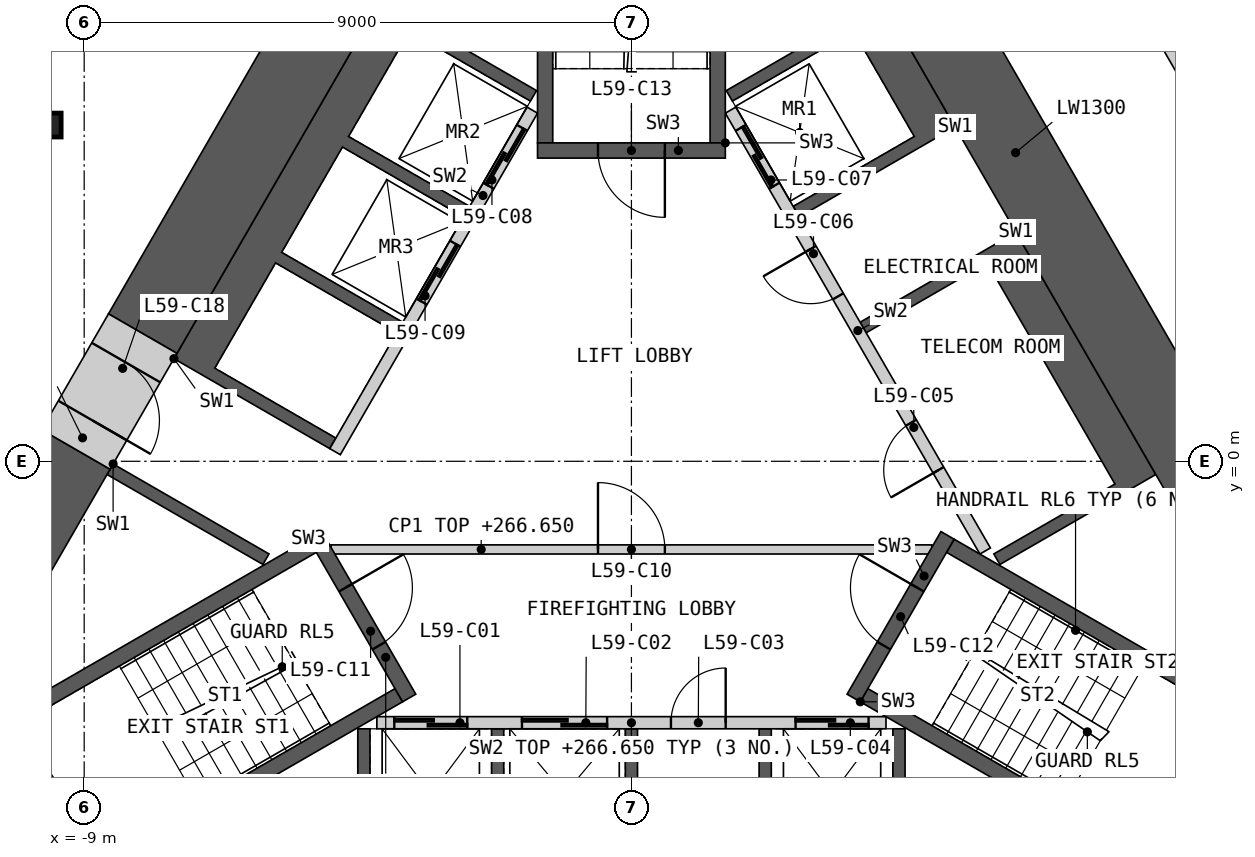
"""IFC4 building model, lengths in metres.
Left out: names, types, materials, properties, quantities, classifications, styles, units other than length and angle.
Written with IfcOpenShell. Run it as: python <this file> out.ifc"""

import sys

from ifc_helpers import new_model, si_unit, direction, frame, frame_2d, origin, origin_2d, place, context, subcontext, project, spatial, polyline, rectangle, i_section, outline, extrude, element, fill, save


model = new_model("IFC4")
c1 = context("Model", 3, precision=1e-05, world=origin(), true_north=direction((0.0, 1.0)))
c2 = subcontext(c1, "Body", "Model", "MODEL_VIEW")
j1 = project(units=[si_unit("LENGTHUNIT", "METRE"), si_unit("PLANEANGLEUNIT", "RADIAN")], contexts=[c1])
p1 = place(None, origin())
s1 = spatial("IfcSite", under=j1, at=p1, CompositionType="ELEMENT")
p2 = place(p1, origin())
s2 = spatial("IfcBuilding", under=s1, at=p2, CompositionType="ELEMENT")
p3 = place(p2, frame((0.0, 0.0, 263.4)))
s3 = spatial("IfcBuildingStorey", under=s2, at=p3, CompositionType="ELEMENT", Elevation=263.4)
p4 = place(p3, frame((-9.578, 5.53, 0.0), z_axis=(0.0, 0.0, 1.0), x_axis=(1.0, 0.0, 0.0)))
e1 = element("IfcColumn", 1, at=p4, inside=s3, PredefinedType="COLUMN", context=c2, shape_type="SweptSolid", body=[
    extrude(i_section(OverallWidth=0.399, OverallDepth=0.393, WebThickness=0.023, FlangeThickness=0.037, at=origin_2d()), origin(), (0.0, 0.0, 1.0), 3.6),
])
p5 = place(p3, origin())
e2 = element("IfcWall", 2, at=p5, inside=s3, PredefinedType="SHEAR", context=c2, shape_type="SweptSolid", body=[
    extrude(outline(polyline([(0.1, -7.36), (-4.5, -7.36), (-4.5, -4.4), (-4.3, -4.4), (-4.3, -6.7), (-2.3, -6.7), (-2.3, -4.4), (-2.1, -4.4), (-2.1, -6.7), (-0.1, -6.7), (-0.1, -4.4), (0.1, -4.4), (0.1, -7.36)])), origin(), (0.0, 0.0, 1.0), 3.25),
])
p6 = place(p3, origin())
e3 = element("IfcWall", 3, at=p6, inside=s3, PredefinedType="SHEAR", context=c2, shape_type="SweptSolid", body=[
    extrude(outline(polyline([(2.1, -7.36), (2.1, -4.4), (2.3, -4.4), (2.3, -6.7), (4.3, -6.7), (4.3, -4.4), (4.5, -4.4), (4.5, -7.36), (2.1, -7.36)])), origin(), (0.0, 0.0, 1.0), 3.25),
])
p7 = place(p3, frame((-4.187, -4.3, 0.0), z_axis=(0.0, 0.0, 1.0), x_axis=(1.0, 0.0, 0.0)))
e4 = element("IfcWall", 4, at=p7, inside=s3, PredefinedType="SOLIDWALL", context=c2, shape_type="SweptSolid", body=[
    extrude(rectangle(XDim=8.373, YDim=0.2, at=frame_2d((4.187, 0.0))), origin(), (0.0, 0.0, 1.0), 3.25),
])
p8 = place(p7, frame((0.287, 0.0, 0.0)))
e5 = element("IfcOpeningElement", 5, at=p8, cuts=e4, PredefinedType="OPENING", context=c2, shape_type="SweptSolid", body=[
    extrude(rectangle(XDim=1.2, YDim=2.1, at=frame_2d((0.6, 1.05))), frame((0.0, 0.11, 0.0), z_axis=(0.0, -1.0, 0.0), x_axis=(1.0, 0.0, 0.0)), (0.0, 0.0, 1.0), 0.22),
])
p9 = place(p7, frame((2.387, 0.0, 0.0)))
e6 = element("IfcOpeningElement", 6, at=p9, cuts=e4, PredefinedType="OPENING", context=c2, shape_type="SweptSolid", body=[
    extrude(rectangle(XDim=1.4, YDim=2.1, at=frame_2d((0.7, 1.05))), frame((0.0, 0.11, 0.0), z_axis=(0.0, -1.0, 0.0), x_axis=(1.0, 0.0, 0.0)), (0.0, 0.0, 1.0), 0.22),
])
p10 = place(p7, frame((4.837, 0.0, 0.0)))
e7 = element("IfcOpeningElement", 7, at=p10, cuts=e4, PredefinedType="OPENING", context=c2, shape_type="SweptSolid", body=[
    extrude(rectangle(XDim=0.9, YDim=2.1, at=frame_2d((0.45, 1.05))), frame((0.0, 0.11, 0.0), z_axis=(0.0, -1.0, 0.0), x_axis=(1.0, 0.0, 0.0)), (0.0, 0.0, 1.0), 0.22),
])
p11 = place(p7, frame((6.887, 0.0, 0.0)))
e8 = element("IfcOpeningElement", 8, at=p11, cuts=e4, PredefinedType="OPENING", context=c2, shape_type="SweptSolid", body=[
    extrude(rectangle(XDim=1.2, YDim=2.1, at=frame_2d((0.6, 1.05))), frame((0.0, 0.11, 0.0), z_axis=(0.0, -1.0, 0.0), x_axis=(1.0, 0.0, 0.0)), (0.0, 0.0, 1.0), 0.22),
])
p12 = place(p3, origin())
e9 = element("IfcWall", 9, at=p12, inside=s3, PredefinedType="SHEAR", context=c2, shape_type="SweptSolid", body=[
    extrude(outline(polyline([(6.324, 3.767), (8.624, -0.217), (8.231, -0.444), (6.061, -1.697), (5.96, -1.524), (7.952, -0.374), (5.852, 3.263), (3.861, 2.113), (3.76, 2.287), (5.931, 3.54), (6.324, 3.767)])), origin(), (0.0, 0.0, 1.0), 3.25),
])
p13 = place(p3, origin())
e10 = element("IfcWall", 10, at=p13, inside=s3, PredefinedType="SHEAR", context=c2, shape_type="SweptSolid", body=[
    extrude(outline(polyline([(5.324, 5.499), (4.931, 5.272), (2.76, 4.019), (2.66, 4.192), (4.652, 5.342), (3.652, 7.074), (1.66, 5.924), (1.561, 6.097), (3.731, 7.35), (4.124, 7.577), (5.324, 5.499)])), origin(), (0.0, 0.0, 1.0), 3.25),
])
p14 = place(p3, frame((5.817, -1.476, 0.0), z_axis=(0.0, 0.0, 1.0), x_axis=(-0.500002616675, 0.866023893041, 0.0)))
e11 = element("IfcWall", 11, at=p14, inside=s3, PredefinedType="SOLIDWALL", context=c2, shape_type="SweptSolid", body=[
    extrude(rectangle(XDim=8.373, YDim=0.2, at=frame_2d((4.187, 0.0))), origin(), (0.0, 0.0, 1.0), 3.25),
])
p15 = place(p14, frame((1.537, 0.0, 0.0)))
e12 = element("IfcOpeningElement", 12, at=p15, cuts=e11, PredefinedType="OPENING", context=c2, shape_type="SweptSolid", body=[
    extrude(rectangle(XDim=0.9, YDim=2.1, at=frame_2d((0.45, 1.05))), frame((0.0, 0.11, 0.0), z_axis=(0.0, -1.0, 0.0), x_axis=(1.0, 0.0, 0.0)), (0.0, 0.0, 1.0), 0.22),
])
p16 = place(p14, frame((4.837, 0.0, 0.0)))
e13 = element("IfcOpeningElement", 13, at=p16, cuts=e11, PredefinedType="OPENING", context=c2, shape_type="SweptSolid", body=[
    extrude(rectangle(XDim=0.9, YDim=2.1, at=frame_2d((0.45, 1.05))), frame((0.0, 0.11, 0.0), z_axis=(0.0, -1.0, 0.0), x_axis=(1.0, 0.0, 0.0)), (0.0, 0.0, 1.0), 0.22),
])
p17 = place(p14, frame((6.937, 0.0, 0.0)))
e14 = element("IfcOpeningElement", 14, at=p17, cuts=e11, PredefinedType="OPENING", context=c2, shape_type="SweptSolid", body=[
    extrude(rectangle(XDim=1.1, YDim=2.1, at=frame_2d((0.55, 1.05))), frame((0.0, 0.11, 0.0), z_axis=(0.0, -1.0, 0.0), x_axis=(1.0, 0.0, 0.0)), (0.0, 0.0, 1.0), 0.22),
])
p18 = place(p3, origin())
e15 = element("IfcWall", 15, at=p18, inside=s3, PredefinedType="SHEAR", context=c2, shape_type="SweptSolid", body=[
    extrude(outline(polyline([(-7.524, 1.688), (-4.124, 7.577), (-3.731, 7.35), (-1.561, 6.097), (-1.66, 5.924), (-3.652, 7.074), (-4.652, 5.342), (-2.66, 4.192), (-2.76, 4.019), (-4.752, 5.169), (-5.752, 3.437), (-3.76, 2.287), (-3.861, 2.113), (-5.852, 3.263), (-6.852, 1.531), (-4.861, 0.381), (-4.96, 0.208), (-7.131, 1.461), (-7.524, 1.688)])), origin(), (0.0, 0.0, 1.0), 3.25),
])
p19 = place(p3, origin())
e16 = element("IfcWall", 16, at=p19, inside=s3, PredefinedType="SHEAR", context=c2, shape_type="SweptSolid", body=[
    extrude(outline(polyline([(-8.524, -0.044), (-8.131, -0.271), (-5.96, -1.524), (-6.061, -1.697), (-8.231, -0.444), (-8.624, -0.217), (-8.524, -0.044)])), origin(), (0.0, 0.0, 1.0), 3.25),
])
p20 = place(p3, frame((-1.631, 5.776, 0.0), z_axis=(0.0, 0.0, 1.0), x_axis=(-0.499992876559, -0.866029516466, 0.0)))
e17 = element("IfcWall", 17, at=p20, inside=s3, PredefinedType="SOLIDWALL", context=c2, shape_type="SweptSolid", body=[
    extrude(rectangle(XDim=6.486, YDim=0.2, at=frame_2d((3.243, 0.0))), origin(), (0.0, 0.0, 1.0), 3.25),
])
p21 = place(p20, frame((0.337, 0.0, 0.0)))
e18 = element("IfcOpeningElement", 18, at=p21, cuts=e17, PredefinedType="OPENING", context=c2, shape_type="SweptSolid", body=[
    extrude(rectangle(XDim=1.1, YDim=2.1, at=frame_2d((0.55, 1.05))), frame((0.0, 0.11, 0.0), z_axis=(0.0, -1.0, 0.0), x_axis=(1.0, 0.0, 0.0)), (0.0, 0.0, 1.0), 0.22),
])
p22 = place(p20, frame((2.537, 0.0, 0.0)))
e19 = element("IfcOpeningElement", 19, at=p22, cuts=e17, PredefinedType="OPENING", context=c2, shape_type="SweptSolid", body=[
    extrude(rectangle(XDim=1.1, YDim=2.1, at=frame_2d((0.55, 1.05))), frame((0.0, 0.11, 0.0), z_axis=(0.0, -1.0, 0.0), x_axis=(1.0, 0.0, 0.0)), (0.0, 0.0, 1.0), 0.22),
])
p23 = place(p3, frame((-4.941, -1.45, 0.0), z_axis=(0.0, 0.0, 1.0), x_axis=(1.0, 0.0, 0.0)))
e20 = element("IfcWall", 20, at=p23, inside=s3, PredefinedType="PARTITIONING", context=c2, shape_type="SweptSolid", body=[
    extrude(rectangle(XDim=9.882, YDim=0.15, at=frame_2d((4.941, 0.0))), origin(), (0.0, 0.0, 1.0), 3.25),
])
p24 = place(p23, frame((4.391, 0.0, 0.0)))
e21 = element("IfcOpeningElement", 21, at=p24, cuts=e20, PredefinedType="OPENING", context=c2, shape_type="SweptSolid", body=[
    extrude(rectangle(XDim=1.1, YDim=2.1, at=frame_2d((0.55, 1.05))), frame((0.0, 0.085, 0.0), z_axis=(0.0, -1.0, 0.0), x_axis=(1.0, 0.0, 0.0)), (0.0, 0.0, 1.0), 0.17),
])
p25 = place(p3, origin())
e22 = element("IfcWall", 22, at=p25, inside=s3, PredefinedType="SHEAR", context=c2, shape_type="SweptSolid", body=[
    extrude(outline(polyline([(-5.307, -1.281), (-10.374, -4.206), (-10.032, -4.298), (-5.182, -1.498), (-5.307, -1.281)])), origin(), (0.0, 0.0, 1.0), 3.25),
])
p26 = place(p3, origin())
e23 = element("IfcWall", 23, at=p26, inside=s3, PredefinedType="SHEAR", context=c2, shape_type="SweptSolid", body=[
    extrude(outline(polyline([(-10.374, -4.206), (-8.83, -6.881), (-8.738, -6.539), (-10.032, -4.298), (-10.374, -4.206)])), origin(), (0.0, 0.0, 1.0), 3.25),
])
p27 = place(p3, origin())
e24 = element("IfcWall", 24, at=p27, inside=s3, PredefinedType="SHEAR", context=c2, shape_type="SweptSolid", body=[
    extrude(outline(polyline([(-8.738, -6.539), (-8.83, -6.881), (-3.763, -3.956), (-3.888, -3.739), (-8.738, -6.539)])), origin(), (0.0, 0.0, 1.0), 3.25),
])
p28 = place(p3, frame((-5.199, -1.219, 0.0), z_axis=(0.0, 0.0, 1.0), x_axis=(0.499982516597, -0.866035497597, 0.0)))
e25 = element("IfcWall", 25, at=p28, inside=s3, PredefinedType="SHEAR", context=c2, shape_type="SweptSolid", body=[
    extrude(rectangle(XDim=3.088, YDim=0.25, at=frame_2d((1.544, 0.0))), origin(), (0.0, 0.0, 1.0), 3.25),
])
p29 = place(p28, frame((0.994, 0.0, 0.0)))
e26 = element("IfcOpeningElement", 26, at=p29, cuts=e25, PredefinedType="OPENING", context=c2, shape_type="SweptSolid", body=[
    extrude(rectangle(XDim=1.1, YDim=2.1, at=frame_2d((0.55, 1.05))), frame((0.0, 0.135, 0.0), z_axis=(0.0, -1.0, 0.0), x_axis=(1.0, 0.0, 0.0)), (0.0, 0.0, 1.0), 0.27),
])
p30 = place(p3, origin())
e27 = element("IfcWall", 27, at=p30, inside=s3, PredefinedType="SHEAR", context=c2, shape_type="SweptSolid", body=[
    extrude(outline(polyline([(3.763, -3.956), (8.83, -6.881), (8.738, -6.539), (3.888, -3.739), (3.763, -3.956)])), origin(), (0.0, 0.0, 1.0), 3.25),
])
p31 = place(p3, origin())
e28 = element("IfcWall", 28, at=p31, inside=s3, PredefinedType="SHEAR", context=c2, shape_type="SweptSolid", body=[
    extrude(outline(polyline([(8.83, -6.881), (10.374, -4.206), (10.032, -4.298), (8.738, -6.539), (8.83, -6.881)])), origin(), (0.0, 0.0, 1.0), 3.25),
])
p32 = place(p3, origin())
e29 = element("IfcWall", 29, at=p32, inside=s3, PredefinedType="SHEAR", context=c2, shape_type="SweptSolid", body=[
    extrude(outline(polyline([(10.032, -4.298), (10.374, -4.206), (5.307, -1.281), (5.182, -1.498), (10.032, -4.298)])), origin(), (0.0, 0.0, 1.0), 3.25),
])
p33 = place(p3, frame((3.655, -3.893, 0.0), z_axis=(0.0, 0.0, 1.0), x_axis=(0.499982516597, 0.866035497597, 0.0)))
e30 = element("IfcWall", 30, at=p33, inside=s3, PredefinedType="SHEAR", context=c2, shape_type="SweptSolid", body=[
    extrude(rectangle(XDim=3.088, YDim=0.25, at=frame_2d((1.544, 0.0))), origin(), (0.0, 0.0, 1.0), 3.25),
])
p34 = place(p33, frame((0.994, 0.0, 0.0)))
e31 = element("IfcOpeningElement", 31, at=p34, cuts=e30, PredefinedType="OPENING", context=c2, shape_type="SweptSolid", body=[
    extrude(rectangle(XDim=1.1, YDim=2.1, at=frame_2d((0.55, 1.05))), frame((0.0, 0.135, 0.0), z_axis=(0.0, -1.0, 0.0), x_axis=(1.0, 0.0, 0.0)), (0.0, 0.0, 1.0), 0.27),
])
p35 = place(p3, origin())
e32 = element("IfcWall", 32, at=p35, inside=s3, PredefinedType="SHEAR", context=c2, shape_type="SweptSolid", body=[
    extrude(outline(polyline([(1.544, 5.237), (1.544, 11.087), (1.294, 10.837), (1.294, 5.237), (1.544, 5.237)])), origin(), (0.0, 0.0, 1.0), 3.25),
])
p36 = place(p3, origin())
e33 = element("IfcWall", 33, at=p36, inside=s3, PredefinedType="SHEAR", context=c2, shape_type="SweptSolid", body=[
    extrude(outline(polyline([(-1.294, 10.837), (-1.544, 11.087), (-1.544, 5.237), (-1.294, 5.237), (-1.294, 10.837)])), origin(), (0.0, 0.0, 1.0), 3.25),
])
p37 = place(p3, frame((1.544, 5.112, 0.0), z_axis=(0.0, 0.0, 1.0), x_axis=(-1.0, 0.0, 0.0)))
e34 = element("IfcWall", 34, at=p37, inside=s3, PredefinedType="SHEAR", context=c2, shape_type="SweptSolid", body=[
    extrude(rectangle(XDim=3.088, YDim=0.25, at=frame_2d((1.544, 0.0))), origin(), (0.0, 0.0, 1.0), 3.25),
])
p38 = place(p37, frame((0.994, 0.0, 0.0)))
e35 = element("IfcOpeningElement", 35, at=p38, cuts=e34, PredefinedType="OPENING", context=c2, shape_type="SweptSolid", body=[
    extrude(rectangle(XDim=1.1, YDim=2.1, at=frame_2d((0.55, 1.05))), frame((0.0, 0.135, 0.0), z_axis=(0.0, -1.0, 0.0), x_axis=(1.0, 0.0, 0.0)), (0.0, 0.0, 1.0), 0.27),
])
p39 = place(p3, frame((10.081, -1.441, 0.0), z_axis=(0.0, 0.0, 1.0), x_axis=(-0.500012180433, 0.866018371294, 0.0)))
e36 = element("IfcWall", 36, at=p39, inside=s3, PredefinedType="SHEAR", context=c2, shape_type="SweptSolid", body=[
    extrude(rectangle(XDim=15.05, YDim=1.3, at=frame_2d((7.525, 0.0))), origin(), (0.0, 0.0, 1.0), 3.25),
])
p40 = place(p3, frame((-4.636, 7.99, 0.0), z_axis=(0.0, 0.0, 1.0), x_axis=(-0.500022813292, -0.866012232124, 0.0)))
e37 = element("IfcWall", 37, at=p40, inside=s3, PredefinedType="SHEAR", context=c2, shape_type="SweptSolid", body=[
    extrude(rectangle(XDim=6.802, YDim=1.3, at=frame_2d((3.401, 0.0))), origin(), (0.0, 0.0, 1.0), 3.25),
])
p41 = place(p3, frame((-9.137, 0.195, 0.0), z_axis=(0.0, 0.0, 1.0), x_axis=(-0.499985697398, -0.866033661238, 0.0)))
e38 = element("IfcWall", 38, at=p41, inside=s3, PredefinedType="SHEAR", context=c2, shape_type="SweptSolid", body=[
    extrude(rectangle(XDim=4.362, YDim=1.3, at=frame_2d((2.181, 0.0))), origin(), (0.0, 0.0, 1.0), 3.25),
])
p42 = place(p3, frame((-8.037, 2.1, 0.0), z_axis=(0.0, 0.0, 1.0), x_axis=(-0.50002983664, -0.866008176907, 0.0)))
e39 = element("IfcWall", 39, at=p42, inside=s3, PredefinedType="SHEAR", context=c2, shape_type="SweptSolid", body=[
    extrude(rectangle(XDim=2.2, YDim=1.3, at=frame_2d((1.1, 0.0))), origin(), (0.0, 0.0, 1.0), 3.25),
])
p43 = place(p42, frame((0.55, 0.0, 0.0)))
e40 = element("IfcOpeningElement", 40, at=p43, cuts=e39, PredefinedType="OPENING", context=c2, shape_type="SweptSolid", body=[
    extrude(rectangle(XDim=1.1, YDim=2.1, at=frame_2d((0.55, 1.05))), frame((0.0, 0.66, 0.0), z_axis=(0.0, -1.0, 0.0), x_axis=(1.0, 0.0, 0.0)), (0.0, 0.0, 1.0), 1.32),
])
p44 = place(p3, frame((-18.976, -4.747, 0.0), z_axis=(0.0, 0.0, 1.0), x_axis=(0.499999852422, 0.866025488988, 0.0)))
e41 = element("IfcWall", 41, at=p44, inside=s3, PredefinedType="PARTITIONING", context=c2, shape_type="SweptSolid", body=[
    extrude(rectangle(XDim=27.198, YDim=0.2, at=frame_2d((13.599, 0.0))), origin(), (0.0, 0.0, 1.0), 3.25),
])
p45 = place(p44, frame((19.886, 0.0, 0.0)))
e42 = element("IfcOpeningElement", 42, at=p45, cuts=e41, PredefinedType="OPENING", context=c2, shape_type="SweptSolid", body=[
    extrude(rectangle(XDim=0.95, YDim=2.1, at=frame_2d((0.475, 1.05))), frame((0.0, 0.11, 0.0), z_axis=(0.0, -1.0, 0.0), x_axis=(1.0, 0.0, 0.0)), (0.0, 0.0, 1.0), 0.22),
])
p46 = place(p44, frame((11.895, 0.0, 0.0)))
e43 = element("IfcOpeningElement", 43, at=p46, cuts=e41, PredefinedType="OPENING", context=c2, shape_type="SweptSolid", body=[
    extrude(rectangle(XDim=1.1, YDim=2.1, at=frame_2d((0.55, 1.05))), frame((0.0, 0.11, 0.0), z_axis=(0.0, -1.0, 0.0), x_axis=(1.0, 0.0, 0.0)), (0.0, 0.0, 1.0), 0.22),
])
p47 = place(p44, frame((1.152, 0.0, 0.0)))
e44 = element("IfcOpeningElement", 44, at=p47, cuts=e41, PredefinedType="OPENING", context=c2, shape_type="SweptSolid", body=[
    extrude(rectangle(XDim=0.95, YDim=2.1, at=frame_2d((0.475, 1.05))), frame((0.0, 0.11, 0.0), z_axis=(0.0, -1.0, 0.0), x_axis=(1.0, 0.0, 0.0)), (0.0, 0.0, 1.0), 0.22),
])
p48 = place(p3, frame((4.91, 13.616, 0.0), z_axis=(0.0, 0.0, 1.0), x_axis=(0.50000207303, -0.866024206917, 0.0)))
e45 = element("IfcWall", 45, at=p48, inside=s3, PredefinedType="PARTITIONING", context=c2, shape_type="SweptSolid", body=[
    extrude(rectangle(XDim=9.095, YDim=0.2, at=frame_2d((4.547, 0.0))), origin(), (0.0, 0.0, 1.0), 3.25),
])
p49 = place(p48, frame((3.698, 0.0, 0.0)))
e46 = element("IfcOpeningElement", 46, at=p49, cuts=e45, PredefinedType="OPENING", context=c2, shape_type="SweptSolid", body=[
    extrude(rectangle(XDim=1.8, YDim=2.1, at=frame_2d((0.9, 1.05))), frame((0.0, 0.11, 0.0), z_axis=(0.0, -1.0, 0.0), x_axis=(1.0, 0.0, 0.0)), (0.0, 0.0, 1.0), 0.22),
])
p50 = place(p8, origin())
e47 = element("IfcDoor", 47, at=p50, inside=s3, OperationType="SLIDING_TO_LEFT", PredefinedType="DOOR", context=c2, shape_type="SweptSolid", body=[
    extrude(rectangle(XDim=1.2, YDim=2.1, at=frame_2d((0.6, 1.05))), frame((0.0, 0.025, 0.0), z_axis=(0.0, -1.0, 0.0), x_axis=(1.0, 0.0, 0.0)), (0.0, 0.0, 1.0), 0.05),
])
fill(e5, e47)
p51 = place(p9, origin())
e48 = element("IfcDoor", 48, at=p51, inside=s3, OperationType="SLIDING_TO_LEFT", PredefinedType="DOOR", context=c2, shape_type="SweptSolid", body=[
    extrude(rectangle(XDim=1.4, YDim=2.1, at=frame_2d((0.7, 1.05))), frame((0.0, 0.025, 0.0), z_axis=(0.0, -1.0, 0.0), x_axis=(1.0, 0.0, 0.0)), (0.0, 0.0, 1.0), 0.05),
])
fill(e6, e48)
p52 = place(p10, origin())
e49 = element("IfcDoor", 49, at=p52, inside=s3, OperationType="SINGLE_SWING_RIGHT", PredefinedType="DOOR", context=c2, shape_type="SweptSolid", body=[
    extrude(rectangle(XDim=0.9, YDim=2.1, at=frame_2d((0.45, 1.05))), frame((0.0, 0.025, 0.0), z_axis=(0.0, -1.0, 0.0), x_axis=(1.0, 0.0, 0.0)), (0.0, 0.0, 1.0), 0.05),
])
fill(e7, e49)
p53 = place(p11, origin())
e50 = element("IfcDoor", 50, at=p53, inside=s3, OperationType="SLIDING_TO_LEFT", PredefinedType="DOOR", context=c2, shape_type="SweptSolid", body=[
    extrude(rectangle(XDim=1.2, YDim=2.1, at=frame_2d((0.6, 1.05))), frame((0.0, 0.025, 0.0), z_axis=(0.0, -1.0, 0.0), x_axis=(1.0, 0.0, 0.0)), (0.0, 0.0, 1.0), 0.05),
])
fill(e8, e50)
p54 = place(p15, origin())
e51 = element("IfcDoor", 51, at=p54, inside=s3, OperationType="SINGLE_SWING_LEFT", PredefinedType="DOOR", context=c2, shape_type="SweptSolid", body=[
    extrude(rectangle(XDim=0.9, YDim=2.1, at=frame_2d((0.45, 1.05))), frame((0.0, 0.025, 0.0), z_axis=(0.0, -1.0, 0.0), x_axis=(1.0, 0.0, 0.0)), (0.0, 0.0, 1.0), 0.05),
])
fill(e12, e51)
p55 = place(p16, origin())
e52 = element("IfcDoor", 52, at=p55, inside=s3, OperationType="SINGLE_SWING_RIGHT", PredefinedType="DOOR", context=c2, shape_type="SweptSolid", body=[
    extrude(rectangle(XDim=0.9, YDim=2.1, at=frame_2d((0.45, 1.05))), frame((0.0, 0.025, 0.0), z_axis=(0.0, -1.0, 0.0), x_axis=(1.0, 0.0, 0.0)), (0.0, 0.0, 1.0), 0.05),
])
fill(e13, e52)
p56 = place(p17, origin())
e53 = element("IfcDoor", 53, at=p56, inside=s3, OperationType="SLIDING_TO_LEFT", PredefinedType="DOOR", context=c2, shape_type="SweptSolid", body=[
    extrude(rectangle(XDim=1.1, YDim=2.1, at=frame_2d((0.55, 1.05))), frame((0.0, 0.025, 0.0), z_axis=(0.0, -1.0, 0.0), x_axis=(1.0, 0.0, 0.0)), (0.0, 0.0, 1.0), 0.05),
])
fill(e14, e53)
p57 = place(p21, origin())
e54 = element("IfcDoor", 54, at=p57, inside=s3, OperationType="SLIDING_TO_LEFT", PredefinedType="DOOR", context=c2, shape_type="SweptSolid", body=[
    extrude(rectangle(XDim=1.1, YDim=2.1, at=frame_2d((0.55, 1.05))), frame((0.0, 0.025, 0.0), z_axis=(0.0, -1.0, 0.0), x_axis=(1.0, 0.0, 0.0)), (0.0, 0.0, 1.0), 0.05),
])
fill(e18, e54)
p58 = place(p22, origin())
e55 = element("IfcDoor", 55, at=p58, inside=s3, OperationType="SLIDING_TO_LEFT", PredefinedType="DOOR", context=c2, shape_type="SweptSolid", body=[
    extrude(rectangle(XDim=1.1, YDim=2.1, at=frame_2d((0.55, 1.05))), frame((0.0, 0.025, 0.0), z_axis=(0.0, -1.0, 0.0), x_axis=(1.0, 0.0, 0.0)), (0.0, 0.0, 1.0), 0.05),
])
fill(e19, e55)
p59 = place(p24, origin())
e56 = element("IfcDoor", 56, at=p59, inside=s3, OperationType="SINGLE_SWING_LEFT", PredefinedType="DOOR", context=c2, shape_type="SweptSolid", body=[
    extrude(rectangle(XDim=1.1, YDim=2.1, at=frame_2d((0.55, 1.05))), frame((0.0, 0.025, 0.0), z_axis=(0.0, -1.0, 0.0), x_axis=(1.0, 0.0, 0.0)), (0.0, 0.0, 1.0), 0.05),
])
fill(e21, e56)
p60 = place(p29, origin())
e57 = element("IfcDoor", 57, at=p60, inside=s3, OperationType="SINGLE_SWING_LEFT", PredefinedType="DOOR", context=c2, shape_type="SweptSolid", body=[
    extrude(rectangle(XDim=1.1, YDim=2.1, at=frame_2d((0.55, 1.05))), frame((0.0, 0.025, 0.0), z_axis=(0.0, -1.0, 0.0), x_axis=(1.0, 0.0, 0.0)), (0.0, 0.0, 1.0), 0.05),
])
fill(e26, e57)
p61 = place(p34, origin())
e58 = element("IfcDoor", 58, at=p61, inside=s3, OperationType="SINGLE_SWING_RIGHT", PredefinedType="DOOR", context=c2, shape_type="SweptSolid", body=[
    extrude(rectangle(XDim=1.1, YDim=2.1, at=frame_2d((0.55, 1.05))), frame((0.0, 0.025, 0.0), z_axis=(0.0, -1.0, 0.0), x_axis=(1.0, 0.0, 0.0)), (0.0, 0.0, 1.0), 0.05),
])
fill(e31, e58)
p62 = place(p38, origin())
e59 = element("IfcDoor", 59, at=p62, inside=s3, OperationType="SINGLE_SWING_LEFT", PredefinedType="DOOR", context=c2, shape_type="SweptSolid", body=[
    extrude(rectangle(XDim=1.1, YDim=2.1, at=frame_2d((0.55, 1.05))), frame((0.0, 0.025, 0.0), z_axis=(0.0, -1.0, 0.0), x_axis=(1.0, 0.0, 0.0)), (0.0, 0.0, 1.0), 0.05),
])
fill(e35, e59)
p63 = place(p43, origin())
e60 = element("IfcDoor", 60, at=p63, inside=s3, OperationType="SINGLE_SWING_RIGHT", PredefinedType="DOOR", context=c2, shape_type="SweptSolid", body=[
    extrude(rectangle(XDim=1.1, YDim=2.1, at=frame_2d((0.55, 1.05))), frame((0.0, 0.405, 0.0), z_axis=(0.0, -1.0, 0.0), x_axis=(1.0, 0.0, 0.0)), (0.0, 0.0, 1.0), 0.05),
])
fill(e40, e60)
save(model, sys.argv[1])
